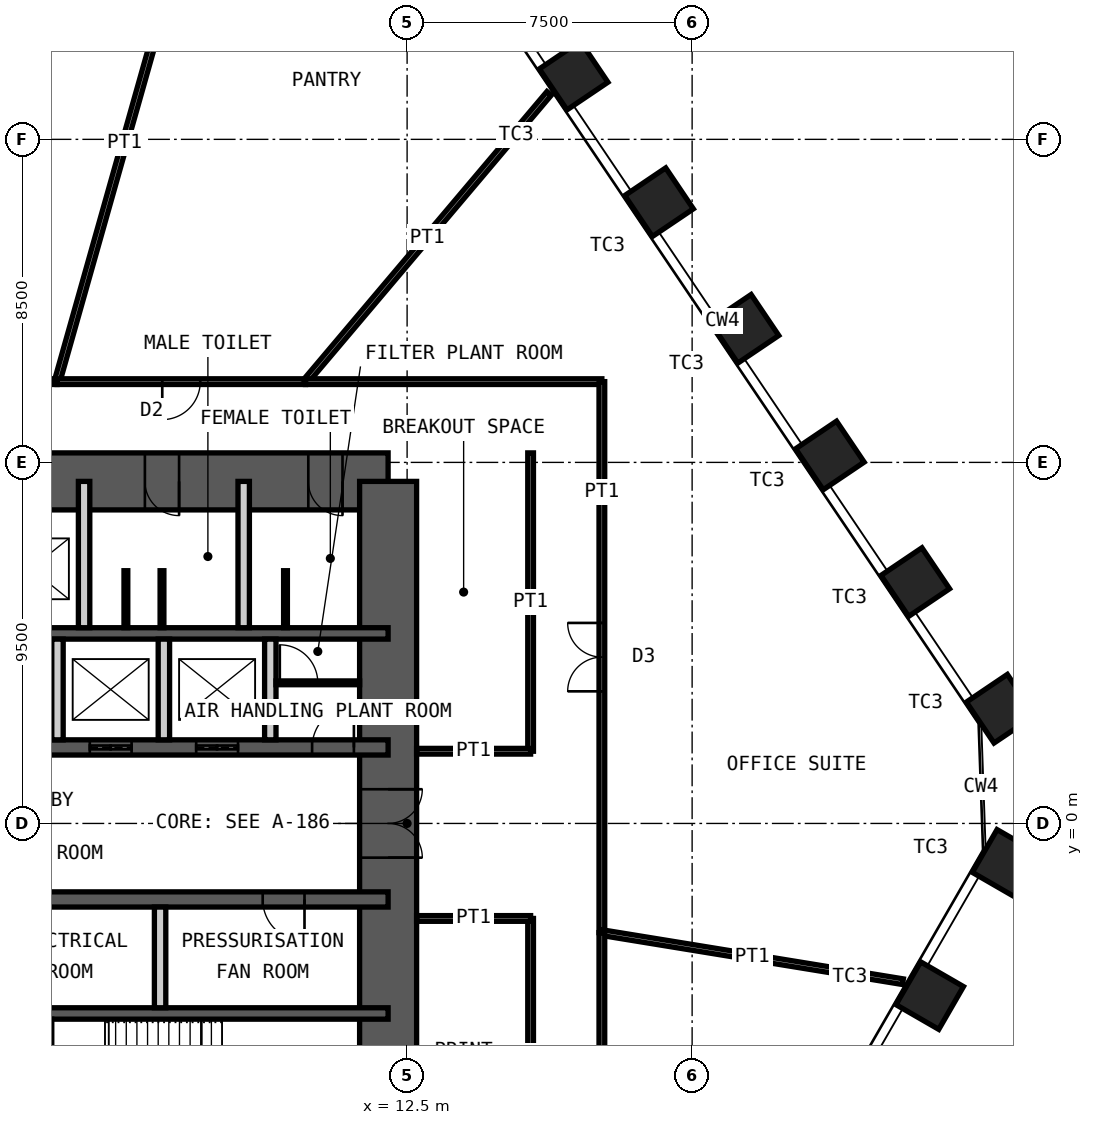
"""IFC4 building model, lengths in metres.
Left out: names, types, materials, properties, quantities, classifications, styles, units other than length and angle.
Written with IfcOpenShell. Run it as: python <this file> out.ifc"""

import sys

from ifc_helpers import new_model, si_unit, direction, frame, frame_2d, origin, origin_2d, place, context, subcontext, project, spatial, rectangle, hollow_rectangle, extrude, element, fill, save


model = new_model("IFC4")
c1 = context("Model", 3, precision=1e-05, world=origin(), true_north=direction((0.0, 1.0)))
c2 = subcontext(c1, "Body", "Model", "MODEL_VIEW")
j1 = project(units=[si_unit("LENGTHUNIT", "METRE"), si_unit("PLANEANGLEUNIT", "RADIAN")], contexts=[c1])
p1 = place(None, origin())
s1 = spatial("IfcSite", under=j1, at=p1, CompositionType="ELEMENT")
p2 = place(p1, origin())
s2 = spatial("IfcBuilding", under=s1, at=p2, CompositionType="ELEMENT")
p3 = place(p2, frame((0.0, 0.0, 107.2)))
s3 = spatial("IfcBuildingStorey", under=s2, at=p3, CompositionType="ELEMENT", Elevation=107.2)
for number, where, z_axis, x_axis in (
    (1, (16.882, 19.678, 0.0), (0.0, 0.0, 1.0), (-0.559, 0.829, 0.0)),
    (2, (19.13, 16.346, 0.0), (0.0, 0.0, 1.0), (-0.559, 0.829, 0.0)),
    (3, (21.377, 13.014, 0.0), (0.0, 0.0, 1.0), (-0.559, 0.829, 0.0)),
    (4, (23.625, 9.682, 0.0), (0.0, 0.0, 1.0), (-0.559, 0.829, 0.0)),
    (5, (25.872, 6.351, 0.0), (0.0, 0.0, 1.0), (-0.559, 0.829, 0.0)),
    (6, (28.119, 3.019, 0.0), (0.0, 0.0, 1.0), (-0.559, 0.829, 0.0)),
    (7, (28.261, -1.05, 0.0), (0.0, 0.0, 1.0), (0.5, 0.866, 0.0)),
    (8, (26.252, -4.53, 0.0), (0.0, 0.0, 1.0), (0.5, 0.866, 0.0)),
):
    element("IfcColumn", number, at=place(p3, frame(where, z_axis=z_axis, x_axis=x_axis)), inside=s3, PredefinedType="COLUMN", context=c2, shape_type="SweptSolid", body=[
        extrude(hollow_rectangle(XDim=1.3, YDim=1.3, WallThickness=0.1, at=origin_2d()), origin(), (0.0, 0.0, 1.0), 4.2),
    ])
p4 = place(p3, frame((-12.0, 9.0, 0.0), z_axis=(0.0, 0.0, 1.0), x_axis=(1.0, 0.0, 0.0)))
e9 = element("IfcWall", 9, at=p4, inside=s3, PredefinedType="SHEAR", context=c2, shape_type="SweptSolid", body=[
    extrude(rectangle(XDim=24.0, YDim=1.5, at=frame_2d((12.0, 0.0))), origin(), (0.0, 0.0, 1.0), 4.2),
])
p5 = place(p4, frame((10.4, 0.0, 0.0)))
e10 = element("IfcOpeningElement", 10, at=p5, cuts=e9, PredefinedType="OPENING", context=c2, shape_type="SweptSolid", body=[
    extrude(rectangle(XDim=1.0, YDim=2.1, at=frame_2d((0.5, 1.05))), frame((0.0, 0.76, 0.0), z_axis=(0.0, -1.0, 0.0), x_axis=(1.0, 0.0, 0.0)), (0.0, 0.0, 1.0), 1.52),
])
p6 = place(p4, frame((17.6, 0.0, 0.0)))
e11 = element("IfcOpeningElement", 11, at=p6, cuts=e9, PredefinedType="OPENING", context=c2, shape_type="SweptSolid", body=[
    extrude(rectangle(XDim=0.9, YDim=2.1, at=frame_2d((0.45, 1.05))), frame((0.0, 0.76, 0.0), z_axis=(0.0, -1.0, 0.0), x_axis=(1.0, 0.0, 0.0)), (0.0, 0.0, 1.0), 1.52),
])
p7 = place(p4, frame((21.9, 0.0, 0.0)))
e12 = element("IfcOpeningElement", 12, at=p7, cuts=e9, PredefinedType="OPENING", context=c2, shape_type="SweptSolid", body=[
    extrude(rectangle(XDim=0.9, YDim=2.1, at=frame_2d((0.45, 1.05))), frame((0.0, 0.76, 0.0), z_axis=(0.0, -1.0, 0.0), x_axis=(1.0, 0.0, 0.0)), (0.0, 0.0, 1.0), 1.52),
])
p8 = place(p3, frame((12.0, -9.0, 0.0), z_axis=(0.0, 0.0, 1.0), x_axis=(0.0, 1.0, 0.0)))
e13 = element("IfcWall", 13, at=p8, inside=s3, PredefinedType="SHEAR", context=c2, shape_type="SweptSolid", body=[
    extrude(rectangle(XDim=18.0, YDim=1.5, at=frame_2d((9.0, 0.0))), origin(), (0.0, 0.0, 1.0), 4.2),
])
p9 = place(p8, frame((8.1, 0.0, 0.0)))
e14 = element("IfcOpeningElement", 14, at=p9, cuts=e13, PredefinedType="OPENING", context=c2, shape_type="SweptSolid", body=[
    extrude(rectangle(XDim=1.8, YDim=2.1, at=frame_2d((0.9, 1.05))), frame((0.0, 0.76, 0.0), z_axis=(0.0, -1.0, 0.0), x_axis=(1.0, 0.0, 0.0)), (0.0, 0.0, 1.0), 1.52),
])
p10 = place(p3, frame((-12.0, 5.0, 0.0), z_axis=(0.0, 0.0, 1.0), x_axis=(1.0, 0.0, 0.0)))
e15 = element("IfcWall", 15, at=p10, inside=s3, PredefinedType="SHEAR", context=c2, shape_type="SweptSolid", body=[
    extrude(rectangle(XDim=24.0, YDim=0.3, at=frame_2d((12.0, 0.0))), origin(), (0.0, 0.0, 1.0), 4.2),
])
p11 = place(p3, frame((-12.0, 2.0, 0.0), z_axis=(0.0, 0.0, 1.0), x_axis=(1.0, 0.0, 0.0)))
e16 = element("IfcWall", 16, at=p11, inside=s3, PredefinedType="SHEAR", context=c2, shape_type="SweptSolid", body=[
    extrude(rectangle(XDim=24.0, YDim=0.4, at=frame_2d((12.0, 0.0))), origin(), (0.0, 0.0, 1.0), 4.2),
])
p12 = place(p11, frame((2.4, 0.0, 0.0)))
e17 = element("IfcOpeningElement", 17, at=p12, cuts=e16, PredefinedType="OPENING", context=c2, shape_type="SweptSolid", body=[
    extrude(rectangle(XDim=1.1, YDim=2.1, at=frame_2d((0.55, 1.05))), frame((0.0, 0.21, 0.0), z_axis=(0.0, -1.0, 0.0), x_axis=(1.0, 0.0, 0.0)), (0.0, 0.0, 1.0), 0.42),
])
p13 = place(p11, frame((22.0, 0.0, 0.0)))
e18 = element("IfcOpeningElement", 18, at=p13, cuts=e16, PredefinedType="OPENING", context=c2, shape_type="SweptSolid", body=[
    extrude(rectangle(XDim=1.1, YDim=2.1, at=frame_2d((0.55, 1.05))), frame((0.0, 0.21, 0.0), z_axis=(0.0, -1.0, 0.0), x_axis=(1.0, 0.0, 0.0)), (0.0, 0.0, 1.0), 0.42),
])
p14 = place(p11, frame((10.15, 0.0, 0.0)))
e19 = element("IfcOpeningElement", 19, at=p14, cuts=e16, PredefinedType="OPENING", context=c2, shape_type="SweptSolid", body=[
    extrude(rectangle(XDim=1.0, YDim=2.1, at=frame_2d((0.5, 1.05))), frame((0.0, 0.21, 0.0), z_axis=(0.0, -1.0, 0.0), x_axis=(1.0, 0.0, 0.0)), (0.0, 0.0, 1.0), 0.42),
])
p15 = place(p11, frame((6.9, 0.0, 0.0)))
e20 = element("IfcOpeningElement", 20, at=p15, cuts=e16, PredefinedType="OPENING", context=c2, shape_type="SweptSolid", body=[
    extrude(rectangle(XDim=1.0, YDim=2.1, at=frame_2d((0.5, 1.05))), frame((0.0, 0.21, 0.0), z_axis=(0.0, -1.0, 0.0), x_axis=(1.0, 0.0, 0.0)), (0.0, 0.0, 1.0), 0.42),
])
p16 = place(p11, frame((13.35, 0.0, 0.0)))
e21 = element("IfcOpeningElement", 21, at=p16, cuts=e16, PredefinedType="OPENING", context=c2, shape_type="SweptSolid", body=[
    extrude(rectangle(XDim=1.1, YDim=2.4, at=frame_2d((0.55, 1.2))), frame((0.0, 0.21, 0.0), z_axis=(0.0, -1.0, 0.0), x_axis=(1.0, 0.0, 0.0)), (0.0, 0.0, 1.0), 0.42),
])
p17 = place(p11, frame((16.15, 0.0, 0.0)))
e22 = element("IfcOpeningElement", 22, at=p17, cuts=e16, PredefinedType="OPENING", context=c2, shape_type="SweptSolid", body=[
    extrude(rectangle(XDim=1.1, YDim=2.4, at=frame_2d((0.55, 1.2))), frame((0.0, 0.21, 0.0), z_axis=(0.0, -1.0, 0.0), x_axis=(1.0, 0.0, 0.0)), (0.0, 0.0, 1.0), 0.42),
])
p18 = place(p11, frame((18.95, 0.0, 0.0)))
e23 = element("IfcOpeningElement", 23, at=p18, cuts=e16, PredefinedType="OPENING", context=c2, shape_type="SweptSolid", body=[
    extrude(rectangle(XDim=1.1, YDim=2.4, at=frame_2d((0.55, 1.2))), frame((0.0, 0.21, 0.0), z_axis=(0.0, -1.0, 0.0), x_axis=(1.0, 0.0, 0.0)), (0.0, 0.0, 1.0), 0.42),
])
p19 = place(p3, frame((-12.0, -2.0, 0.0), z_axis=(0.0, 0.0, 1.0), x_axis=(1.0, 0.0, 0.0)))
e24 = element("IfcWall", 24, at=p19, inside=s3, PredefinedType="SHEAR", context=c2, shape_type="SweptSolid", body=[
    extrude(rectangle(XDim=24.0, YDim=0.4, at=frame_2d((12.0, 0.0))), origin(), (0.0, 0.0, 1.0), 4.2),
])
p20 = place(p19, frame((1.1, 0.0, 0.0)))
e25 = element("IfcOpeningElement", 25, at=p20, cuts=e24, PredefinedType="OPENING", context=c2, shape_type="SweptSolid", body=[
    extrude(rectangle(XDim=1.1, YDim=2.1, at=frame_2d((0.55, 1.05))), frame((0.0, 0.21, 0.0), z_axis=(0.0, -1.0, 0.0), x_axis=(1.0, 0.0, 0.0)), (0.0, 0.0, 1.0), 0.42),
])
p21 = place(p19, frame((13.55, 0.0, 0.0)))
e26 = element("IfcOpeningElement", 26, at=p21, cuts=e24, PredefinedType="OPENING", context=c2, shape_type="SweptSolid", body=[
    extrude(rectangle(XDim=1.1, YDim=2.1, at=frame_2d((0.55, 1.05))), frame((0.0, 0.21, 0.0), z_axis=(0.0, -1.0, 0.0), x_axis=(1.0, 0.0, 0.0)), (0.0, 0.0, 1.0), 0.42),
])
p22 = place(p19, frame((20.7, 0.0, 0.0)))
e27 = element("IfcOpeningElement", 27, at=p22, cuts=e24, PredefinedType="OPENING", context=c2, shape_type="SweptSolid", body=[
    extrude(rectangle(XDim=1.1, YDim=2.1, at=frame_2d((0.55, 1.05))), frame((0.0, 0.21, 0.0), z_axis=(0.0, -1.0, 0.0), x_axis=(1.0, 0.0, 0.0)), (0.0, 0.0, 1.0), 0.42),
])
p23 = place(p3, frame((-12.0, -5.0, 0.0), z_axis=(0.0, 0.0, 1.0), x_axis=(1.0, 0.0, 0.0)))
e28 = element("IfcWall", 28, at=p23, inside=s3, PredefinedType="SHEAR", context=c2, shape_type="SweptSolid", body=[
    extrude(rectangle(XDim=24.0, YDim=0.3, at=frame_2d((12.0, 0.0))), origin(), (0.0, 0.0, 1.0), 4.2),
])
for number, where, z_axis, x_axis in (
    (29, (4.0, 5.15, 0.0), (0.0, 0.0, 1.0), (0.0, 1.0, 0.0)),
    (30, (8.2, 5.15, 0.0), (0.0, 0.0, 1.0), (0.0, 1.0, 0.0)),
):
    element("IfcWall", number, at=place(p3, frame(where, z_axis=z_axis, x_axis=x_axis)), inside=s3, PredefinedType="PARTITIONING", context=c2, shape_type="SweptSolid", body=[
        extrude(rectangle(XDim=3.85, YDim=0.3, at=frame_2d((1.925, 0.0))), origin(), (0.0, 0.0, 1.0), 3.98),
    ])
for number, where, z_axis, x_axis in (
    (31, (3.3, 2.2, 0.0), (0.0, 0.0, 1.0), (0.0, 1.0, 0.0)),
    (32, (6.1, 2.2, 0.0), (0.0, 0.0, 1.0), (0.0, 1.0, 0.0)),
    (33, (8.9, 2.2, 0.0), (0.0, 0.0, 1.0), (0.0, 1.0, 0.0)),
    (34, (6.0, -4.85, 0.0), (0.0, 0.0, 1.0), (0.0, 1.0, 0.0)),
):
    element("IfcWall", number, at=place(p3, frame(where, z_axis=z_axis, x_axis=x_axis)), inside=s3, PredefinedType="PARTITIONING", context=c2, shape_type="SweptSolid", body=[
        extrude(rectangle(XDim=2.65, YDim=0.3, at=frame_2d((1.325, 0.0))), origin(), (0.0, 0.0, 1.0), 3.98),
    ])
p24 = place(p3, frame((3.0, -9.0, 0.0), z_axis=(0.0, 0.0, 1.0), x_axis=(0.0, 1.0, 0.0)))
e35 = element("IfcWall", 35, at=p24, inside=s3, PredefinedType="PARTITIONING", context=c2, shape_type="SweptSolid", body=[
    extrude(rectangle(XDim=3.85, YDim=0.3, at=frame_2d((1.925, 0.0))), origin(), (0.0, 0.0, 1.0), 3.98),
])
p25 = place(p24, frame((1.425, 0.0, 0.0)))
e36 = element("IfcOpeningElement", 36, at=p25, cuts=e35, PredefinedType="OPENING", context=c2, shape_type="SweptSolid", body=[
    extrude(rectangle(XDim=1.0, YDim=2.1, at=frame_2d((0.5, 1.05))), frame((0.0, 0.16, 0.0), z_axis=(0.0, -1.0, 0.0), x_axis=(1.0, 0.0, 0.0)), (0.0, 0.0, 1.0), 0.32),
])
p26 = place(p3, frame((9.05, 3.7, 0.0), z_axis=(0.0, 0.0, 1.0), x_axis=(1.0, 0.0, 0.0)))
e37 = element("IfcWall", 37, at=p26, inside=s3, PredefinedType="PARTITIONING", context=c2, shape_type="SweptSolid", body=[
    extrude(rectangle(XDim=2.2, YDim=0.1, at=frame_2d((1.1, 0.0))), origin(), (0.0, 0.0, 1.0), 3.98),
])
p27 = place(p26, frame((0.1, 0.0, 0.0)))
e38 = element("IfcOpeningElement", 38, at=p27, cuts=e37, PredefinedType="OPENING", context=c2, shape_type="SweptSolid", body=[
    extrude(rectangle(XDim=1.0, YDim=2.4, at=frame_2d((0.5, 1.2))), frame((0.0, 0.06, 0.0), z_axis=(0.0, -1.0, 0.0), x_axis=(1.0, 0.0, 0.0)), (0.0, 0.0, 1.0), 0.12),
])
for number, where, z_axis, x_axis in (
    (39, (5.1, 5.15, 0.0), (0.0, 0.0, 1.0), (0.0, 1.0, 0.0)),
    (40, (6.05, 5.15, 0.0), (0.0, 0.0, 1.0), (0.0, 1.0, 0.0)),
    (41, (9.3, 5.15, 0.0), (0.0, 0.0, 1.0), (0.0, 1.0, 0.0)),
):
    element("IfcWall", number, at=place(p3, frame(where, z_axis=z_axis, x_axis=x_axis)), inside=s3, PredefinedType="PARTITIONING", context=c2, shape_type="SweptSolid", body=[
        extrude(rectangle(XDim=1.5, YDim=0.1, at=frame_2d((0.75, 0.0))), origin(), (0.0, 0.0, 1.0), 2.1),
    ])
p28 = place(p3, frame((1.366, 11.625, 0.0), z_axis=(0.0, 0.0, 1.0), x_axis=(1.0, 0.0, 0.0)))
e42 = element("IfcWall", 42, at=p28, inside=s3, PredefinedType="PARTITIONING", context=c2, shape_type="SweptSolid", body=[
    extrude(rectangle(XDim=1.923, YDim=0.15, at=frame_2d((0.961, 0.0))), origin(), (0.0, 0.0, 1.0), 4.03),
])
p29 = place(p28, frame((0.461, 0.0, 0.0)))
e43 = element("IfcOpeningElement", 43, at=p29, cuts=e42, PredefinedType="OPENING", context=c2, shape_type="SweptSolid", body=[
    extrude(rectangle(XDim=1.0, YDim=2.4, at=frame_2d((0.5, 1.2))), frame((0.0, 0.085, 0.0), z_axis=(0.0, -1.0, 0.0), x_axis=(1.0, 0.0, 0.0)), (0.0, 0.0, 1.0), 0.17),
])
p30 = place(p3, frame((6.846, 24.204, 0.0), z_axis=(0.0, 0.0, 1.0), x_axis=(-0.272184461049, -0.962245093084, 0.0)))
e44 = element("IfcWall", 44, at=p30, inside=s3, PredefinedType="PARTITIONING", context=c2, shape_type="SweptSolid", body=[
    extrude(rectangle(XDim=13.073, YDim=0.15, at=frame_2d((6.536, 0.0))), origin(), (0.0, 0.0, 1.0), 3.33),
])
p31 = place(p3, frame((3.288, 11.625, 0.0), z_axis=(0.0, 0.0, 1.0), x_axis=(1.0, 0.0, 0.0)))
e45 = element("IfcWall", 45, at=p31, inside=s3, PredefinedType="PARTITIONING", context=c2, shape_type="SweptSolid", body=[
    extrude(rectangle(XDim=6.538, YDim=0.15, at=frame_2d((3.269, 0.0))), origin(), (0.0, 0.0, 1.0), 4.03),
])
p32 = place(p31, frame((2.769, 0.0, 0.0)))
e46 = element("IfcOpeningElement", 46, at=p32, cuts=e45, PredefinedType="OPENING", context=c2, shape_type="SweptSolid", body=[
    extrude(rectangle(XDim=1.0, YDim=2.4, at=frame_2d((0.5, 1.2))), frame((0.0, 0.085, 0.0), z_axis=(0.0, -1.0, 0.0), x_axis=(1.0, 0.0, 0.0)), (0.0, 0.0, 1.0), 0.17),
])
p33 = place(p3, frame((16.237, 19.21, 0.0), z_axis=(0.0, 0.0, 1.0), x_axis=(-0.645526723652, -0.763737683404, 0.0)))
e47 = element("IfcWall", 47, at=p33, inside=s3, PredefinedType="PARTITIONING", context=c2, shape_type="SweptSolid", body=[
    extrude(rectangle(XDim=9.932, YDim=0.15, at=frame_2d((4.966, 0.0))), origin(), (0.0, 0.0, 1.0), 3.33),
])
p34 = place(p3, frame((9.826, 11.625, 0.0), z_axis=(0.0, 0.0, 1.0), x_axis=(1.0, 0.0, 0.0)))
e48 = element("IfcWall", 48, at=p34, inside=s3, PredefinedType="PARTITIONING", context=c2, shape_type="SweptSolid", body=[
    extrude(rectangle(XDim=7.799, YDim=0.15, at=frame_2d((3.899, 0.0))), origin(), (0.0, 0.0, 1.0), 4.03),
])
p35 = place(p3, frame((17.625, 11.625, 0.0), z_axis=(0.0, 0.0, 1.0), x_axis=(0.0, -1.0, 0.0)))
e49 = element("IfcWall", 49, at=p35, inside=s3, PredefinedType="PARTITIONING", context=c2, shape_type="SweptSolid", body=[
    extrude(rectangle(XDim=14.498, YDim=0.15, at=frame_2d((7.249, 0.0))), origin(), (0.0, 0.0, 1.0), 4.03),
])
p36 = place(p35, frame((6.349, 0.0, 0.0)))
e50 = element("IfcOpeningElement", 50, at=p36, cuts=e49, PredefinedType="OPENING", context=c2, shape_type="SweptSolid", body=[
    extrude(rectangle(XDim=1.8, YDim=2.4, at=frame_2d((0.9, 1.2))), frame((0.0, 0.085, 0.0), z_axis=(0.0, -1.0, 0.0), x_axis=(1.0, 0.0, 0.0)), (0.0, 0.0, 1.0), 0.17),
])
p37 = place(p3, frame((25.547, -4.164, 0.0), z_axis=(0.0, 0.0, 1.0), x_axis=(-0.986975392039, 0.160871301072, 0.0)))
e51 = element("IfcWall", 51, at=p37, inside=s3, PredefinedType="PARTITIONING", context=c2, shape_type="SweptSolid", body=[
    extrude(rectangle(XDim=8.027, YDim=0.15, at=frame_2d((4.013, 0.0))), origin(), (0.0, 0.0, 1.0), 4.03),
])
p38 = place(p3, frame((17.625, -2.873, 0.0), z_axis=(0.0, 0.0, 1.0), x_axis=(0.0, -1.0, 0.0)))
e52 = element("IfcWall", 52, at=p38, inside=s3, PredefinedType="PARTITIONING", context=c2, shape_type="SweptSolid", body=[
    extrude(rectangle(XDim=8.752, YDim=0.15, at=frame_2d((4.376, 0.0))), origin(), (0.0, 0.0, 1.0), 4.03),
])
p39 = place(p3, frame((15.75, 1.9, 0.0), z_axis=(0.0, 0.0, 1.0), x_axis=(0.0, 1.0, 0.0)))
e53 = element("IfcWall", 53, at=p39, inside=s3, PredefinedType="PARTITIONING", context=c2, shape_type="SweptSolid", body=[
    extrude(rectangle(XDim=7.85, YDim=0.15, at=frame_2d((3.925, 0.0))), origin(), (0.0, 0.0, 1.0), 4.03),
])
p40 = place(p3, frame((12.75, 1.9, 0.0), z_axis=(0.0, 0.0, 1.0), x_axis=(1.0, 0.0, 0.0)))
e54 = element("IfcWall", 54, at=p40, inside=s3, PredefinedType="PARTITIONING", context=c2, shape_type="SweptSolid", body=[
    extrude(rectangle(XDim=3.0, YDim=0.15, at=frame_2d((1.5, 0.0))), origin(), (0.0, 0.0, 1.0), 2.93),
])
p41 = place(p3, frame((15.75, -9.75, 0.0), z_axis=(0.0, 0.0, 1.0), x_axis=(0.0, 1.0, 0.0)))
e55 = element("IfcWall", 55, at=p41, inside=s3, PredefinedType="PARTITIONING", context=c2, shape_type="SweptSolid", body=[
    extrude(rectangle(XDim=7.25, YDim=0.15, at=frame_2d((3.625, 0.0))), origin(), (0.0, 0.0, 1.0), 4.03),
])
p42 = place(p3, frame((12.75, -2.5, 0.0), z_axis=(0.0, 0.0, 1.0), x_axis=(1.0, 0.0, 0.0)))
e56 = element("IfcWall", 56, at=p42, inside=s3, PredefinedType="PARTITIONING", context=c2, shape_type="SweptSolid", body=[
    extrude(rectangle(XDim=3.0, YDim=0.15, at=frame_2d((1.5, 0.0))), origin(), (0.0, 0.0, 1.0), 3.33),
])
p43 = place(p6, origin())
e57 = element("IfcDoor", 57, at=p43, inside=s3, OperationType="SINGLE_SWING_RIGHT", PredefinedType="DOOR", context=c2, shape_type="SweptSolid", body=[
    extrude(rectangle(XDim=0.9, YDim=2.1, at=frame_2d((0.45, 1.05))), frame((0.0, 0.025, 0.0), z_axis=(0.0, -1.0, 0.0), x_axis=(1.0, 0.0, 0.0)), (0.0, 0.0, 1.0), 0.05),
])
fill(e11, e57)
p44 = place(p7, origin())
e58 = element("IfcDoor", 58, at=p44, inside=s3, OperationType="SINGLE_SWING_RIGHT", PredefinedType="DOOR", context=c2, shape_type="SweptSolid", body=[
    extrude(rectangle(XDim=0.9, YDim=2.1, at=frame_2d((0.45, 1.05))), frame((0.0, 0.025, 0.0), z_axis=(0.0, -1.0, 0.0), x_axis=(1.0, 0.0, 0.0)), (0.0, 0.0, 1.0), 0.05),
])
fill(e12, e58)
p45 = place(p13, origin())
e59 = element("IfcDoor", 59, at=p45, inside=s3, OperationType="SINGLE_SWING_LEFT", PredefinedType="DOOR", context=c2, shape_type="SweptSolid", body=[
    extrude(rectangle(XDim=1.1, YDim=2.1, at=frame_2d((0.55, 1.05))), frame((0.0, 0.025, 0.0), z_axis=(0.0, -1.0, 0.0), x_axis=(1.0, 0.0, 0.0)), (0.0, 0.0, 1.0), 0.05),
])
fill(e18, e59)
p46 = place(p22, origin())
e60 = element("IfcDoor", 60, at=p46, inside=s3, OperationType="SINGLE_SWING_RIGHT", PredefinedType="DOOR", context=c2, shape_type="SweptSolid", body=[
    extrude(rectangle(XDim=1.1, YDim=2.1, at=frame_2d((0.55, 1.05))), frame((0.0, 0.025, 0.0), z_axis=(0.0, -1.0, 0.0), x_axis=(1.0, 0.0, 0.0)), (0.0, 0.0, 1.0), 0.05),
])
fill(e27, e60)
p47 = place(p9, origin())
e61 = element("IfcDoor", 61, at=p47, inside=s3, OperationType="DOUBLE_DOOR_DOUBLE_SWING", PredefinedType="DOOR", context=c2, shape_type="SweptSolid", body=[
    extrude(rectangle(XDim=1.8, YDim=2.1, at=frame_2d((0.9, 1.05))), frame((0.0, 0.025, 0.0), z_axis=(0.0, -1.0, 0.0), x_axis=(1.0, 0.0, 0.0)), (0.0, 0.0, 1.0), 0.05),
])
fill(e14, e61)
p48 = place(p17, origin())
e62 = element("IfcDoor", 62, at=p48, inside=s3, OperationType="DOUBLE_DOOR_SLIDING", PredefinedType="DOOR", context=c2, shape_type="SweptSolid", body=[
    extrude(rectangle(XDim=1.1, YDim=2.4, at=frame_2d((0.55, 1.2))), frame((0.0, 0.025, 0.0), z_axis=(0.0, -1.0, 0.0), x_axis=(1.0, 0.0, 0.0)), (0.0, 0.0, 1.0), 0.05),
])
fill(e22, e62)
p49 = place(p18, origin())
e63 = element("IfcDoor", 63, at=p49, inside=s3, OperationType="DOUBLE_DOOR_SLIDING", PredefinedType="DOOR", context=c2, shape_type="SweptSolid", body=[
    extrude(rectangle(XDim=1.1, YDim=2.4, at=frame_2d((0.55, 1.2))), frame((0.0, 0.025, 0.0), z_axis=(0.0, -1.0, 0.0), x_axis=(1.0, 0.0, 0.0)), (0.0, 0.0, 1.0), 0.05),
])
fill(e23, e63)
p50 = place(p27, origin())
e64 = element("IfcDoor", 64, at=p50, inside=s3, OperationType="SINGLE_SWING_RIGHT", PredefinedType="DOOR", context=c2, shape_type="SweptSolid", body=[
    extrude(rectangle(XDim=1.0, YDim=2.4, at=frame_2d((0.5, 1.2))), frame((0.0, 0.025, 0.0), z_axis=(0.0, -1.0, 0.0), x_axis=(1.0, 0.0, 0.0)), (0.0, 0.0, 1.0), 0.05),
])
fill(e38, e64)
p51 = place(p32, origin())
e65 = element("IfcDoor", 65, at=p51, inside=s3, OperationType="SINGLE_SWING_LEFT", PredefinedType="DOOR", context=c2, shape_type="SweptSolid", body=[
    extrude(rectangle(XDim=1.0, YDim=2.4, at=frame_2d((0.5, 1.2))), frame((0.0, 0.025, 0.0), z_axis=(0.0, -1.0, 0.0), x_axis=(1.0, 0.0, 0.0)), (0.0, 0.0, 1.0), 0.05),
])
fill(e46, e65)
p52 = place(p36, origin())
e66 = element("IfcDoor", 66, at=p52, inside=s3, OperationType="DOUBLE_DOOR_DOUBLE_SWING", PredefinedType="DOOR", context=c2, shape_type="SweptSolid", body=[
    extrude(rectangle(XDim=1.8, YDim=2.4, at=frame_2d((0.9, 1.2))), frame((0.0, 0.025, 0.0), z_axis=(0.0, -1.0, 0.0), x_axis=(1.0, 0.0, 0.0)), (0.0, 0.0, 1.0), 0.05),
])
fill(e50, e66)
save(model, sys.argv[1])
